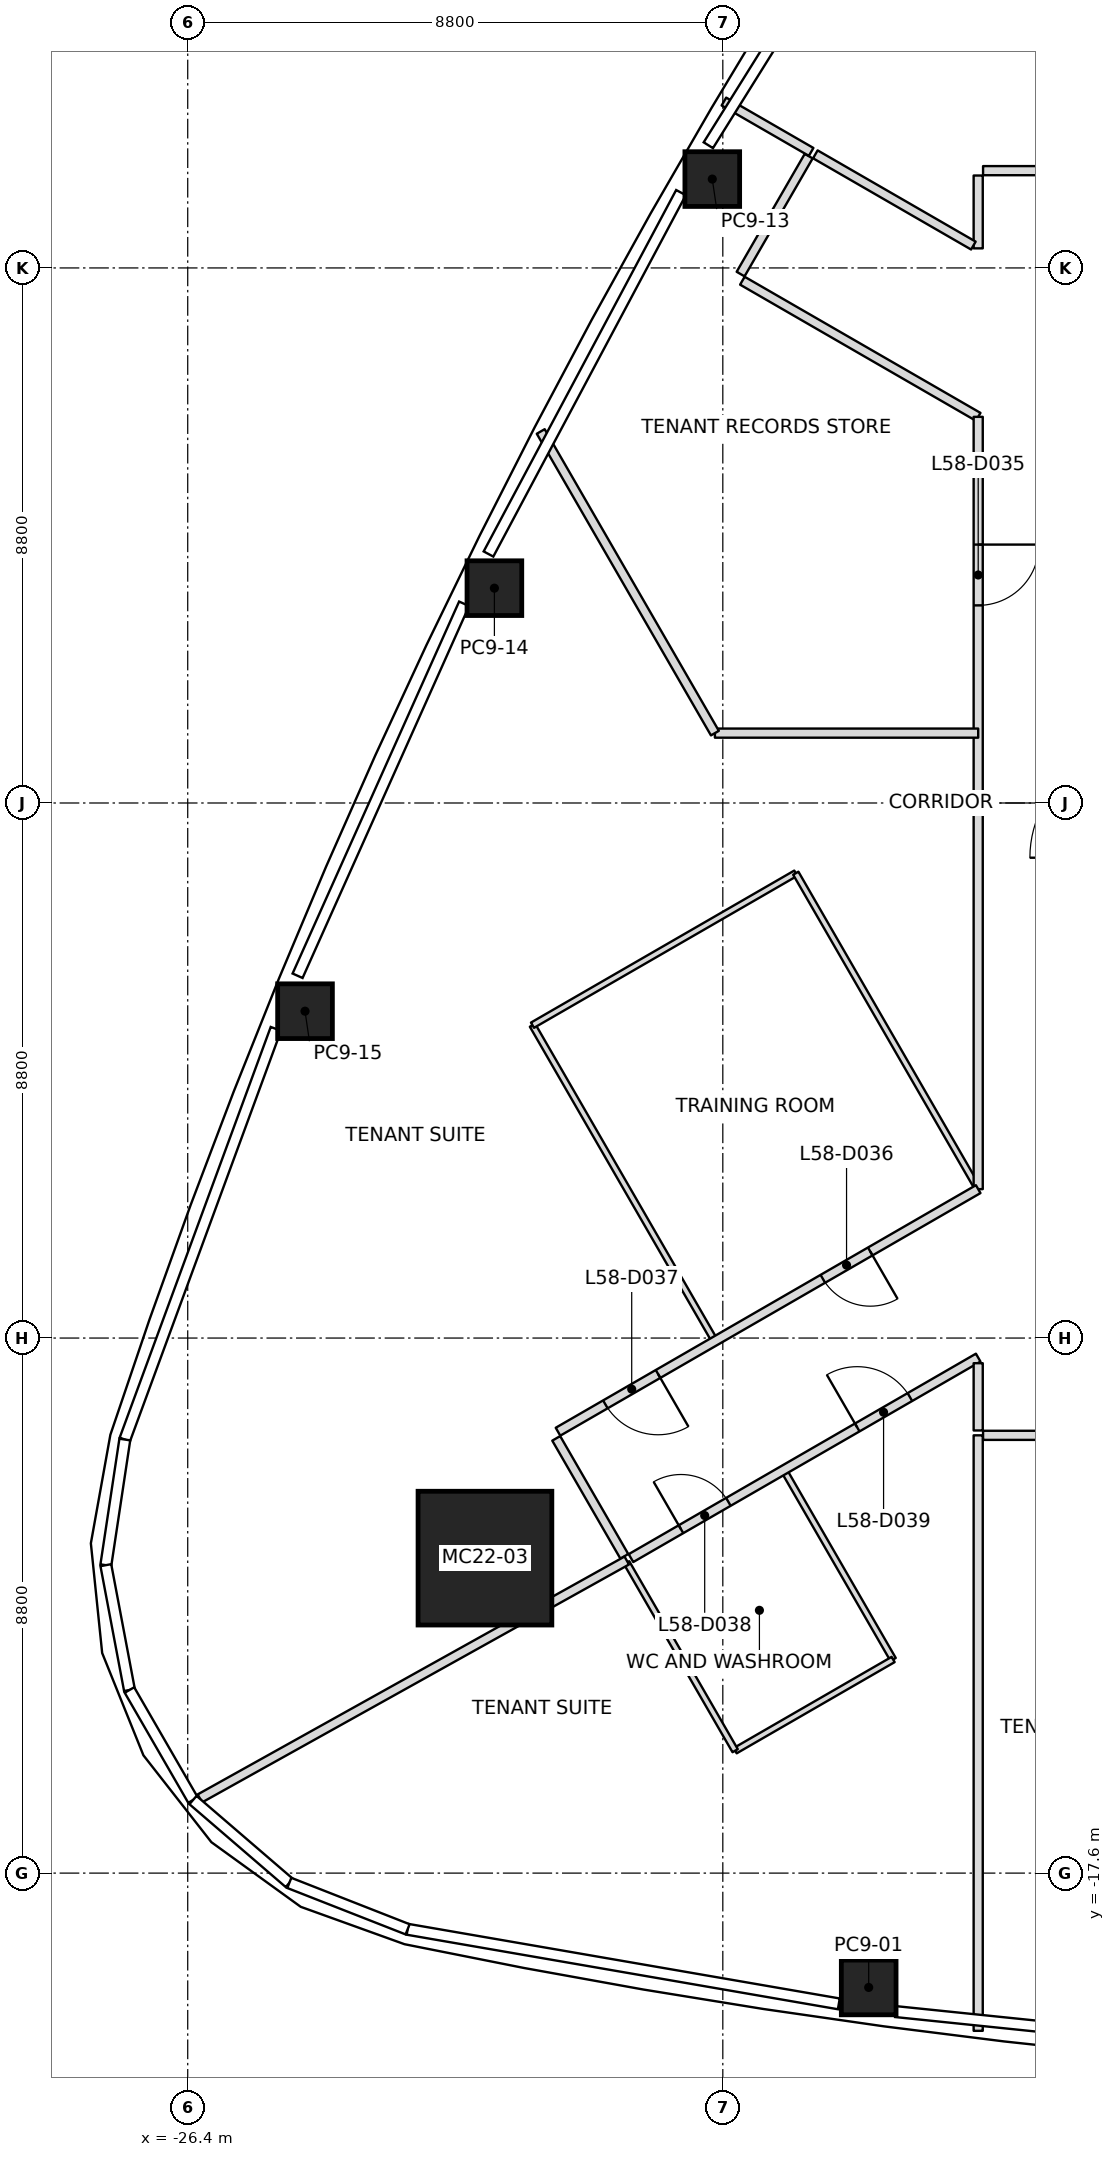
"""IFC4 building model, lengths in metres.
Left out: names, types, materials, properties, quantities, classifications, styles, units other than length and angle.
Written with IfcOpenShell. Run it as: python <this file> out.ifc"""

import sys

from ifc_helpers import new_model, si_unit, direction, frame, frame_2d, origin, origin_2d, place, context, subcontext, project, spatial, rectangle, extrude, element, fill, save


model = new_model("IFC4")
c1 = context("Model", 3, precision=1e-05, world=origin(), true_north=direction((0.0, 1.0)))
c2 = subcontext(c1, "Body", "Model", "MODEL_VIEW")
j1 = project(units=[si_unit("LENGTHUNIT", "METRE"), si_unit("PLANEANGLEUNIT", "RADIAN")], contexts=[c1])
p1 = place(None, origin())
s1 = spatial("IfcSite", under=j1, at=p1, CompositionType="ELEMENT")
p2 = place(p1, origin())
s2 = spatial("IfcBuilding", under=s1, at=p2, CompositionType="ELEMENT")
p3 = place(p2, frame((0.0, 0.0, 259.0)))
s3 = spatial("IfcBuildingStorey", under=s2, at=p3, CompositionType="ELEMENT", Elevation=259.0)
p4 = place(p3, frame((-21.512, -12.42, 0.0), z_axis=(0.027817676907, 0.016043967164, 0.999484250986), x_axis=(0.999613013546, -0.000446478676, -0.027814093645)))
e1 = element("IfcColumn", 1, at=p4, inside=s3, PredefinedType="COLUMN", context=c2, shape_type="SweptSolid", body=[
    extrude(rectangle(XDim=2.2, YDim=2.2, at=origin_2d()), origin(), (0.0, 0.0, 1.0), 4.002),
])
p5 = place(p3, frame((-15.201, -19.48, 0.0), z_axis=(0.017452445502, 0.010434853779, 0.999793241612), x_axis=(-0.990486490869, 0.136692598023, 0.015863324104)))
e2 = element("IfcColumn", 2, at=p5, inside=s3, PredefinedType="COLUMN", context=c2, shape_type="SweptSolid", body=[
    extrude(rectangle(XDim=0.9, YDim=0.9, at=origin_2d()), origin(), (0.0, 0.0, 1.0), 4.001),
])
p6 = place(p3, frame((-17.773, 10.261, 0.0), z_axis=(0.009887049298, -0.00573692984, 0.999934664812), x_axis=(0.499975560967, 0.866039512843, 2.5126546e-05)))
e3 = element("IfcColumn", 3, at=p6, inside=s3, PredefinedType="COLUMN", context=c2, shape_type="SweptSolid", body=[
    extrude(rectangle(XDim=0.9, YDim=0.9, at=origin_2d()), origin(), (0.0, 0.0, 1.0), 4.0),
])
p7 = place(p3, frame((-21.356, 3.533, 0.0), z_axis=(0.014036674448, 0.002013957638, 0.999899452818), x_axis=(0.439532201194, 0.89819139108, -0.007979292125)))
e4 = element("IfcColumn", 4, at=p7, inside=s3, PredefinedType="COLUMN", context=c2, shape_type="SweptSolid", body=[
    extrude(rectangle(XDim=0.9, YDim=0.9, at=origin_2d()), origin(), (0.0, 0.0, 1.0), 4.0),
])
p8 = place(p3, frame((-24.471, -3.424, 0.0), z_axis=(0.017757551143, 0.009946669541, 0.999792845115), x_axis=(0.377029787594, 0.926064480145, -0.015909678861)))
e5 = element("IfcColumn", 5, at=p8, inside=s3, PredefinedType="COLUMN", context=c2, shape_type="SweptSolid", body=[
    extrude(rectangle(XDim=0.9, YDim=0.9, at=origin_2d()), origin(), (0.0, 0.0, 1.0), 4.001),
])
p9 = place(p3, frame((-19.18, -12.459, 0.0), z_axis=(0.0, 0.0, 1.0), x_axis=(-0.873518893781, -0.486790244569, 0.0)))
e6 = element("IfcWall", 6, at=p9, inside=s3, PredefinedType="PARTITIONING", context=c2, shape_type="SweptSolid", body=[
    extrude(rectangle(XDim=8.037, YDim=0.15, at=frame_2d((4.019, 0.0))), origin(), (0.0, 0.0, 1.0), 3.234),
])
p10 = place(p3, frame((-13.4, 1.149, 0.0), z_axis=(0.0, 0.0, 1.0), x_axis=(-1.0, 0.0, 0.0)))
e7 = element("IfcWall", 7, at=p10, inside=s3, PredefinedType="PARTITIONING", context=c2, shape_type="SweptSolid", body=[
    extrude(rectangle(XDim=4.33, YDim=0.15, at=frame_2d((2.165, 0.0))), origin(), (0.0, 0.0, 1.0), 3.45),
])
p11 = place(p3, frame((-17.73, 1.149, 0.0), z_axis=(0.0, 0.0, 1.0), x_axis=(-0.500002807145, 0.866023783073, 0.0)))
e8 = element("IfcWall", 8, at=p11, inside=s3, PredefinedType="PARTITIONING", context=c2, shape_type="SweptSolid", body=[
    extrude(rectangle(XDim=5.729, YDim=0.15, at=frame_2d((2.865, 0.0))), origin(), (0.0, 0.0, 1.0), 3.234),
])
p12 = place(p3, frame((-16.147, 10.708, 0.0), z_axis=(0.0, 0.0, 1.0), x_axis=(-0.866057962423, 0.499943602543, 0.0)))
e9 = element("IfcWall", 9, at=p12, inside=s3, PredefinedType="PARTITIONING", context=c2, shape_type="SweptSolid", body=[
    extrude(rectangle(XDim=1.656, YDim=0.15, at=frame_2d((0.828, 0.0))), origin(), (0.0, 0.0, 1.0), 3.234),
])
p13 = place(p3, frame((-13.4, -10.4, 0.0), z_axis=(0.0, 0.0, 1.0), x_axis=(0.0, -1.0, 0.0)))
e10 = element("IfcWall", 10, at=p13, inside=s3, PredefinedType="PARTITIONING", context=c2, shape_type="SweptSolid", body=[
    extrude(rectangle(XDim=9.794, YDim=0.15, at=frame_2d((4.897, 0.0))), origin(), (0.0, 0.0, 1.0), 3.234),
])
p14 = place(p3, frame((-20.34, -10.45, 0.0), z_axis=(0.0, 0.0, 1.0), x_axis=(0.500030632641, -0.866007717299, 0.0)))
e11 = element("IfcWall", 11, at=p14, inside=s3, PredefinedType="PARTITIONING", context=c2, shape_type="SweptSolid", body=[
    extrude(rectangle(XDim=2.24, YDim=0.15, at=frame_2d((1.12, 0.0))), origin(), (0.0, 0.0, 1.0), 3.233),
])
p15 = place(p3, frame((-17.278, 8.59, 0.0), z_axis=(0.0, 0.0, 1.0), x_axis=(0.866020361036, -0.500008734195, 0.0)))
e12 = element("IfcWall", 12, at=p15, inside=s3, PredefinedType="PARTITIONING", context=c2, shape_type="SweptSolid", body=[
    extrude(rectangle(XDim=4.479, YDim=0.15, at=frame_2d((2.239, 0.0))), origin(), (0.0, 0.0, 1.0), 3.45),
])
p16 = place(p3, frame((-13.4, 6.351, 0.0), z_axis=(0.0, 0.0, 1.0), x_axis=(0.0, -1.0, 0.0)))
e13 = element("IfcWall", 13, at=p16, inside=s3, PredefinedType="PARTITIONING", context=c2, shape_type="SweptSolid", body=[
    extrude(rectangle(XDim=12.702, YDim=0.15, at=frame_2d((6.351, 0.0))), origin(), (0.0, 0.0, 1.0), 3.317),
])
p17 = place(p16, frame((2.101, 0.0, 0.0)))
e14 = element("IfcOpeningElement", 14, at=p17, cuts=e13, PredefinedType="OPENING", context=c2, shape_type="SweptSolid", body=[
    extrude(rectangle(XDim=1.0, YDim=2.1, at=frame_2d((0.5, 1.05))), frame((0.0, 0.075, 0.0), z_axis=(0.0, -1.0, 0.0), x_axis=(1.0, 0.0, 0.0)), (0.0, 0.0, 1.0), 0.15),
])
p18 = place(p3, frame((-13.4, -6.351, 0.0), z_axis=(0.0, 0.0, 1.0), x_axis=(-0.866031719379, -0.499989060909, 0.0)))
e15 = element("IfcWall", 15, at=p18, inside=s3, PredefinedType="PARTITIONING", context=c2, shape_type="SweptSolid", body=[
    extrude(rectangle(XDim=7.98, YDim=0.15, at=frame_2d((3.99, 0.0))), origin(), (0.0, 0.0, 1.0), 3.317),
])
p19 = place(p18, frame((2.05, 0.0, 0.0)))
e16 = element("IfcOpeningElement", 16, at=p19, cuts=e15, PredefinedType="OPENING", context=c2, shape_type="SweptSolid", body=[
    extrude(rectangle(XDim=0.9, YDim=2.1, at=frame_2d((0.45, 1.05))), frame((0.0, 0.075, 0.0), z_axis=(0.0, -1.0, 0.0), x_axis=(1.0, 0.0, 0.0)), (0.0, 0.0, 1.0), 0.15),
])
p20 = place(p18, frame((6.08, 0.0, 0.0)))
e17 = element("IfcOpeningElement", 17, at=p20, cuts=e15, PredefinedType="OPENING", context=c2, shape_type="SweptSolid", body=[
    extrude(rectangle(XDim=1.0, YDim=2.1, at=frame_2d((0.5, 1.05))), frame((0.0, 0.075, 0.0), z_axis=(0.0, -1.0, 0.0), x_axis=(1.0, 0.0, 0.0)), (0.0, 0.0, 1.0), 0.15),
])
p21 = place(p3, frame((-19.111, -12.419, 0.0), z_axis=(0.0, 0.0, 1.0), x_axis=(0.866022199768, 0.500005549479, 0.0)))
e18 = element("IfcWall", 18, at=p21, inside=s3, PredefinedType="PARTITIONING", context=c2, shape_type="SweptSolid", body=[
    extrude(rectangle(XDim=6.594, YDim=0.15, at=frame_2d((3.297, 0.0))), origin(), (0.0, 0.0, 1.0), 3.233),
])
p22 = place(p21, frame((0.95, 0.0, 0.0)))
e19 = element("IfcOpeningElement", 19, at=p22, cuts=e18, PredefinedType="OPENING", context=c2, shape_type="SweptSolid", body=[
    extrude(rectangle(XDim=0.9, YDim=2.1, at=frame_2d((0.45, 1.05))), frame((0.0, 0.075, 0.0), z_axis=(0.0, -1.0, 0.0), x_axis=(1.0, 0.0, 0.0)), (0.0, 0.0, 1.0), 0.15),
])
p23 = place(p21, frame((4.297, 0.0, 0.0)))
e20 = element("IfcOpeningElement", 20, at=p23, cuts=e18, PredefinedType="OPENING", context=c2, shape_type="SweptSolid", body=[
    extrude(rectangle(XDim=1.0, YDim=2.1, at=frame_2d((0.5, 1.05))), frame((0.0, 0.075, 0.0), z_axis=(0.0, -1.0, 0.0), x_axis=(1.0, 0.0, 0.0)), (0.0, 0.0, 1.0), 0.15),
])
p24 = place(p3, frame((-13.4, -9.214, 0.0), z_axis=(0.0, 0.0, 1.0), x_axis=(0.0, -1.0, 0.0)))
e21 = element("IfcWall", 21, at=p24, inside=s3, PredefinedType="PARTITIONING", context=c2, shape_type="SweptSolid", body=[
    extrude(rectangle(XDim=1.106, YDim=0.15, at=frame_2d((0.553, 0.0))), origin(), (0.0, 0.0, 1.0), 3.233),
])
p25 = place(p3, frame((-16.188, 10.639, 0.0), z_axis=(0.0, 0.0, 1.0), x_axis=(-0.500030632641, -0.866007717299, 0.0)))
e22 = element("IfcWall", 22, at=p25, inside=s3, PredefinedType="PARTITIONING", context=c2, shape_type="SweptSolid", body=[
    extrude(rectangle(XDim=2.24, YDim=0.15, at=frame_2d((1.12, 0.0))), origin(), (0.0, 0.0, 1.0), 3.45),
])
p26 = place(p3, frame((-13.4, 10.32, 0.0), z_axis=(0.0, 0.0, 1.0), x_axis=(0.0, -1.0, 0.0)))
e23 = element("IfcWall", 23, at=p26, inside=s3, PredefinedType="PARTITIONING", context=c2, shape_type="SweptSolid", body=[
    extrude(rectangle(XDim=1.198, YDim=0.15, at=frame_2d((0.599, 0.0))), origin(), (0.0, 0.0, 1.0), 3.45),
])
p27 = place(p3, frame((-13.479, 9.168, 0.0), z_axis=(0.0, 0.0, 1.0), x_axis=(-0.866041993159, 0.49997126526, 0.0)))
e24 = element("IfcWall", 24, at=p27, inside=s3, PredefinedType="PARTITIONING", context=c2, shape_type="SweptSolid", body=[
    extrude(rectangle(XDim=3.001, YDim=0.15, at=frame_2d((1.5, 0.0))), origin(), (0.0, 0.0, 1.0), 3.45),
])
p28 = place(p3, frame((-13.32, -10.4, 0.0), z_axis=(0.0, 0.0, 1.0), x_axis=(1.0, 0.0, 0.0)))
e25 = element("IfcWall", 25, at=p28, inside=s3, PredefinedType="PARTITIONING", context=c2, shape_type="SweptSolid", body=[
    extrude(rectangle(XDim=12.12, YDim=0.15, at=frame_2d((6.06, 0.0))), origin(), (0.0, 0.0, 1.0), 3.317),
])
p29 = place(p28, frame((1.77, 0.0, 0.0)))
e26 = element("IfcOpeningElement", 26, at=p29, cuts=e25, PredefinedType="OPENING", context=c2, shape_type="SweptSolid", body=[
    extrude(rectangle(XDim=1.0, YDim=2.1, at=frame_2d((0.5, 1.05))), frame((0.0, 0.075, 0.0), z_axis=(0.0, -1.0, 0.0), x_axis=(1.0, 0.0, 0.0)), (0.0, 0.0, 1.0), 0.15),
])
p30 = place(p28, frame((7.87, 0.0, 0.0)))
e27 = element("IfcOpeningElement", 27, at=p30, cuts=e25, PredefinedType="OPENING", context=c2, shape_type="SweptSolid", body=[
    extrude(rectangle(XDim=1.0, YDim=2.1, at=frame_2d((0.5, 1.05))), frame((0.0, 0.075, 0.0), z_axis=(0.0, -1.0, 0.0), x_axis=(1.0, 0.0, 0.0)), (0.0, 0.0, 1.0), 0.15),
])
p31 = place(p3, frame((-1.2, 10.4, 0.0), z_axis=(0.0, 0.0, 1.0), x_axis=(-1.0, 0.0, 0.0)))
e28 = element("IfcWall", 28, at=p31, inside=s3, PredefinedType="PARTITIONING", context=c2, shape_type="SweptSolid", body=[
    extrude(rectangle(XDim=12.12, YDim=0.15, at=frame_2d((6.06, 0.0))), origin(), (0.0, 0.0, 1.0), 3.443),
])
p32 = place(p31, frame((1.35, 0.0, 0.0)))
e29 = element("IfcOpeningElement", 29, at=p32, cuts=e28, PredefinedType="OPENING", context=c2, shape_type="SweptSolid", body=[
    extrude(rectangle(XDim=0.9, YDim=2.1, at=frame_2d((0.45, 1.05))), frame((0.0, 0.075, 0.0), z_axis=(0.0, -1.0, 0.0), x_axis=(1.0, 0.0, 0.0)), (0.0, 0.0, 1.0), 0.15),
])
p33 = place(p31, frame((7.45, 0.0, 0.0)))
e30 = element("IfcOpeningElement", 30, at=p33, cuts=e28, PredefinedType="OPENING", context=c2, shape_type="SweptSolid", body=[
    extrude(rectangle(XDim=1.0, YDim=2.1, at=frame_2d((0.5, 1.05))), frame((0.0, 0.075, 0.0), z_axis=(0.0, -1.0, 0.0), x_axis=(1.0, 0.0, 0.0)), (0.0, 0.0, 1.0), 0.15),
])
p34 = place(p3, frame((-16.584, -10.995, 0.0), z_axis=(0.0, 0.0, 1.0), x_axis=(0.499971082179, -0.866042098853, 0.0)))
e31 = element("IfcWall", 31, at=p34, inside=s3, PredefinedType="PARTITIONING", context=c2, shape_type="SweptSolid", body=[
    extrude(rectangle(XDim=3.57, YDim=0.1, at=frame_2d((1.785, 0.0))), origin(), (0.0, 0.0, 1.0), 3.45),
])
p35 = place(p3, frame((-14.799, -14.087, 0.0), z_axis=(0.0, 0.0, 1.0), x_axis=(-0.866031096941, -0.499990139034, 0.0)))
e32 = element("IfcWall", 32, at=p35, inside=s3, PredefinedType="PARTITIONING", context=c2, shape_type="SweptSolid", body=[
    extrude(rectangle(XDim=3.0, YDim=0.1, at=frame_2d((1.5, 0.0))), origin(), (0.0, 0.0, 1.0), 3.45),
])
p36 = place(p3, frame((-17.397, -15.587, 0.0), z_axis=(0.0, 0.0, 1.0), x_axis=(-0.499971082179, 0.866042098853, 0.0)))
e33 = element("IfcWall", 33, at=p36, inside=s3, PredefinedType="PARTITIONING", context=c2, shape_type="SweptSolid", body=[
    extrude(rectangle(XDim=3.57, YDim=0.1, at=frame_2d((1.785, 0.0))), origin(), (0.0, 0.0, 1.0), 3.45),
])
p37 = place(p3, frame((-17.745, -8.825, 0.0), z_axis=(0.0, 0.0, 1.0), x_axis=(-0.499983233416, 0.86603508376, 0.0)))
e34 = element("IfcWall", 34, at=p37, inside=s3, PredefinedType="PARTITIONING", context=c2, shape_type="SweptSolid", body=[
    extrude(rectangle(XDim=5.97, YDim=0.1, at=frame_2d((2.985, 0.0))), origin(), (0.0, 0.0, 1.0), 3.443),
])
p38 = place(p3, frame((-20.73, -3.655, 0.0), z_axis=(0.0, 0.0, 1.0), x_axis=(0.866022959057, 0.500004234368, 0.0)))
e35 = element("IfcWall", 35, at=p38, inside=s3, PredefinedType="PARTITIONING", context=c2, shape_type="SweptSolid", body=[
    extrude(rectangle(XDim=5.0, YDim=0.1, at=frame_2d((2.5, 0.0))), origin(), (0.0, 0.0, 1.0), 3.317),
])
p39 = place(p3, frame((-16.4, -1.155, 0.0), z_axis=(0.0, 0.0, 1.0), x_axis=(0.500007084799, -0.866021313335, 0.0)))
e36 = element("IfcWall", 36, at=p39, inside=s3, PredefinedType="PARTITIONING", context=c2, shape_type="SweptSolid", body=[
    extrude(rectangle(XDim=5.94, YDim=0.1, at=frame_2d((2.97, 0.0))), origin(), (0.0, 0.0, 1.0), 3.317),
])
p40 = place(p17, origin())
e37 = element("IfcDoor", 37, at=p40, inside=s3, OperationType="SINGLE_SWING_RIGHT", PredefinedType="DOOR", context=c2, shape_type="SweptSolid", body=[
    extrude(rectangle(XDim=1.0, YDim=2.1, at=frame_2d((0.5, 1.05))), frame((0.0, 0.025, 0.0), z_axis=(0.0, -1.0, 0.0), x_axis=(1.0, 0.0, 0.0)), (0.0, 0.0, 1.0), 0.05),
])
fill(e14, e37)
p41 = place(p19, origin())
e38 = element("IfcDoor", 38, at=p41, inside=s3, OperationType="SINGLE_SWING_RIGHT", PredefinedType="DOOR", context=c2, shape_type="SweptSolid", body=[
    extrude(rectangle(XDim=0.9, YDim=2.1, at=frame_2d((0.45, 1.05))), frame((0.0, 0.025, 0.0), z_axis=(0.0, -1.0, 0.0), x_axis=(1.0, 0.0, 0.0)), (0.0, 0.0, 1.0), 0.05),
])
fill(e16, e38)
p42 = place(p20, origin())
e39 = element("IfcDoor", 39, at=p42, inside=s3, OperationType="SINGLE_SWING_RIGHT", PredefinedType="DOOR", context=c2, shape_type="SweptSolid", body=[
    extrude(rectangle(XDim=1.0, YDim=2.1, at=frame_2d((0.5, 1.05))), frame((0.0, 0.025, 0.0), z_axis=(0.0, -1.0, 0.0), x_axis=(1.0, 0.0, 0.0)), (0.0, 0.0, 1.0), 0.05),
])
fill(e17, e39)
p43 = place(p22, origin())
e40 = element("IfcDoor", 40, at=p43, inside=s3, OperationType="SINGLE_SWING_RIGHT", PredefinedType="DOOR", context=c2, shape_type="SweptSolid", body=[
    extrude(rectangle(XDim=0.9, YDim=2.1, at=frame_2d((0.45, 1.05))), frame((0.0, 0.025, 0.0), z_axis=(0.0, -1.0, 0.0), x_axis=(1.0, 0.0, 0.0)), (0.0, 0.0, 1.0), 0.05),
])
fill(e19, e40)
p44 = place(p23, origin())
e41 = element("IfcDoor", 41, at=p44, inside=s3, OperationType="SINGLE_SWING_LEFT", PredefinedType="DOOR", context=c2, shape_type="SweptSolid", body=[
    extrude(rectangle(XDim=1.0, YDim=2.1, at=frame_2d((0.5, 1.05))), frame((0.0, 0.025, 0.0), z_axis=(0.0, -1.0, 0.0), x_axis=(1.0, 0.0, 0.0)), (0.0, 0.0, 1.0), 0.05),
])
fill(e20, e41)
save(model, sys.argv[1])
